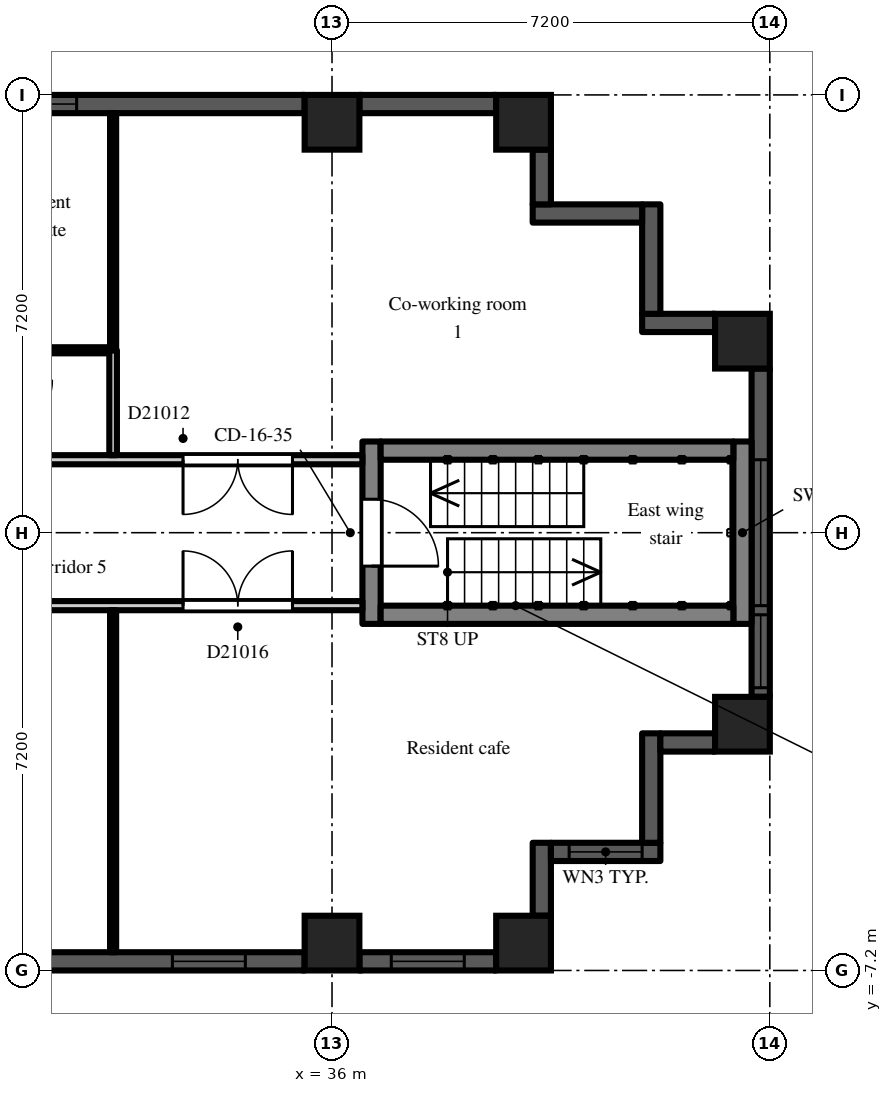
"""IFC4 building model, lengths in metres.
Left out: names, types, materials, properties, quantities, classifications, styles, units other than length and angle.
Written with IfcOpenShell. Run it as: python <this file> out.ifc"""

import sys

from ifc_helpers import new_model, si_unit, direction, frame, frame_2d, origin, origin_2d, place, context, subcontext, project, spatial, rectangle, extrude, element, fill, save


model = new_model("IFC4")
c1 = context("Model", 3, precision=1e-05, world=origin(), true_north=direction((0.0, 1.0)))
c2 = subcontext(c1, "Body", "Model", "MODEL_VIEW")
j1 = project(units=[si_unit("LENGTHUNIT", "METRE"), si_unit("PLANEANGLEUNIT", "RADIAN")], contexts=[c1])
p1 = place(None, origin())
s1 = spatial("IfcSite", under=j1, at=p1, CompositionType="ELEMENT")
p2 = place(p1, origin())
s2 = spatial("IfcBuilding", under=s1, at=p2, CompositionType="ELEMENT")
p3 = place(p2, frame((0.0, 0.0, 147.3)))
s3 = spatial("IfcBuildingStorey", under=s2, at=p3, CompositionType="ELEMENT", Elevation=147.3)
for number, where, z_axis, x_axis in (
    (1, (36.0, -6.75, 0.0), (0.0, 0.0, 1.0), (1.0, 0.0, 0.0)),
    (2, (36.0, 6.75, 0.0), (0.0, 0.0, 1.0), (1.0, 0.0, 0.0)),
    (3, (39.15, -6.75, 0.0), (0.0, 0.0, 1.0), (1.0, 0.0, 0.0)),
    (4, (39.15, 6.75, 0.0), (0.0, 0.0, 1.0), (1.0, 0.0, 0.0)),
    (5, (42.75, -3.15, 0.0), (0.0, 0.0, 1.0), (1.0, 0.0, 0.0)),
    (6, (42.75, 3.15, 0.0), (0.0, 0.0, 1.0), (1.0, 0.0, 0.0)),
):
    element("IfcColumn", number, at=place(p3, frame(where, z_axis=z_axis, x_axis=x_axis)), inside=s3, PredefinedType="COLUMN", context=c2, shape_type="SweptSolid", body=[
        extrude(rectangle(XDim=0.9, YDim=0.9, at=origin_2d()), origin(), (0.0, 0.0, 1.0), 3.0),
    ])
p4 = place(p3, frame((29.25, -7.05, 0.0), z_axis=(0.0, 0.0, 1.0), x_axis=(1.0, 0.0, 0.0)))
e7 = element("IfcWall", 7, at=p4, inside=s3, PredefinedType="SOLIDWALL", context=c2, shape_type="SweptSolid", body=[
    extrude(rectangle(XDim=6.3, YDim=0.3, at=frame_2d((3.15, 0.0))), origin(), (0.0, 0.0, 1.0), 2.2),
])
p5 = place(p4, frame((4.125, 0.0, 0.2)))
e8 = element("IfcOpeningElement", 8, at=p5, cuts=e7, PredefinedType="OPENING", context=c2, shape_type="SweptSolid", body=[
    extrude(rectangle(XDim=1.2, YDim=1.85, at=frame_2d((0.6, 0.925))), frame((0.0, 0.16, 0.0), z_axis=(0.0, -1.0, 0.0), x_axis=(1.0, 0.0, 0.0)), (0.0, 0.0, 1.0), 0.32),
])
p6 = place(p3, frame((36.45, -7.05, 0.0), z_axis=(0.0, 0.0, 1.0), x_axis=(1.0, 0.0, 0.0)))
e9 = element("IfcWall", 9, at=p6, inside=s3, PredefinedType="SOLIDWALL", context=c2, shape_type="SweptSolid", body=[
    extrude(rectangle(XDim=2.25, YDim=0.3, at=frame_2d((1.125, 0.0))), origin(), (0.0, 0.0, 1.0), 2.2),
])
p7 = place(p6, frame((0.525, 0.0, 0.2)))
e10 = element("IfcOpeningElement", 10, at=p7, cuts=e9, PredefinedType="OPENING", context=c2, shape_type="SweptSolid", body=[
    extrude(rectangle(XDim=1.2, YDim=1.85, at=frame_2d((0.6, 0.925))), frame((0.0, 0.16, 0.0), z_axis=(0.0, -1.0, 0.0), x_axis=(1.0, 0.0, 0.0)), (0.0, 0.0, 1.0), 0.32),
])
p8 = place(p3, frame((39.45, -6.3, 0.0), z_axis=(0.0, 0.0, 1.0), x_axis=(0.0, 1.0, 0.0)))
e11 = element("IfcWall", 11, at=p8, inside=s3, PredefinedType="SOLIDWALL", context=c2, shape_type="SweptSolid", body=[
    extrude(rectangle(XDim=1.2, YDim=0.3, at=frame_2d((0.6, 0.0))), origin(), (0.0, 0.0, 1.0), 2.6),
])
p9 = place(p3, frame((39.6, -5.25, 0.0), z_axis=(0.0, 0.0, 1.0), x_axis=(1.0, 0.0, 0.0)))
e12 = element("IfcWall", 12, at=p9, inside=s3, PredefinedType="SOLIDWALL", context=c2, shape_type="SweptSolid", body=[
    extrude(rectangle(XDim=1.8, YDim=0.3, at=frame_2d((0.9, 0.0))), origin(), (0.0, 0.0, 1.0), 2.6),
])
p10 = place(p9, frame((0.3, 0.0, 0.2)))
e13 = element("IfcOpeningElement", 13, at=p10, cuts=e12, PredefinedType="OPENING", context=c2, shape_type="SweptSolid", body=[
    extrude(rectangle(XDim=1.2, YDim=1.85, at=frame_2d((0.6, 0.925))), frame((0.0, 0.16, 0.0), z_axis=(0.0, -1.0, 0.0), x_axis=(1.0, 0.0, 0.0)), (0.0, 0.0, 1.0), 0.32),
])
p11 = place(p3, frame((41.25, -5.1, 0.0), z_axis=(0.0, 0.0, 1.0), x_axis=(0.0, 1.0, 0.0)))
e14 = element("IfcWall", 14, at=p11, inside=s3, PredefinedType="SOLIDWALL", context=c2, shape_type="SweptSolid", body=[
    extrude(rectangle(XDim=1.8, YDim=0.3, at=frame_2d((0.9, 0.0))), origin(), (0.0, 0.0, 1.0), 2.6),
])
p12 = place(p3, frame((41.4, -3.45, 0.0), z_axis=(0.0, 0.0, 1.0), x_axis=(1.0, 0.0, 0.0)))
e15 = element("IfcWall", 15, at=p12, inside=s3, PredefinedType="SOLIDWALL", context=c2, shape_type="SweptSolid", body=[
    extrude(rectangle(XDim=0.9, YDim=0.3, at=frame_2d((0.45, 0.0))), origin(), (0.0, 0.0, 1.0), 2.6),
])
p13 = place(p3, frame((43.05, -2.7, 0.0), z_axis=(0.0, 0.0, 1.0), x_axis=(0.0, 1.0, 0.0)))
e16 = element("IfcWall", 16, at=p13, inside=s3, PredefinedType="SOLIDWALL", context=c2, shape_type="SweptSolid", body=[
    extrude(rectangle(XDim=5.4, YDim=0.3, at=frame_2d((2.7, 0.0))), origin(), (0.0, 0.0, 1.0), 2.2),
])
p14 = place(p13, frame((1.5, 0.0, 0.2)))
e17 = element("IfcOpeningElement", 17, at=p14, cuts=e16, PredefinedType="OPENING", context=c2, shape_type="SweptSolid", body=[
    extrude(rectangle(XDim=2.4, YDim=1.85, at=frame_2d((1.2, 0.925))), frame((0.0, 0.16, 0.0), z_axis=(0.0, -1.0, 0.0), x_axis=(1.0, 0.0, 0.0)), (0.0, 0.0, 1.0), 0.32),
])
p15 = place(p13, frame((0.15, 0.0, 0.2)))
e18 = element("IfcOpeningElement", 18, at=p15, cuts=e16, PredefinedType="OPENING", context=c2, shape_type="SweptSolid", body=[
    extrude(rectangle(XDim=1.2, YDim=1.85, at=frame_2d((0.6, 0.925))), frame((0.0, 0.16, 0.0), z_axis=(0.0, -1.0, 0.0), x_axis=(1.0, 0.0, 0.0)), (0.0, 0.0, 1.0), 0.32),
])
p16 = place(p3, frame((42.3, 3.45, 0.0), z_axis=(0.0, 0.0, 1.0), x_axis=(-1.0, 0.0, 0.0)))
e19 = element("IfcWall", 19, at=p16, inside=s3, PredefinedType="SOLIDWALL", context=c2, shape_type="SweptSolid", body=[
    extrude(rectangle(XDim=1.2, YDim=0.3, at=frame_2d((0.6, 0.0))), origin(), (0.0, 0.0, 1.0), 2.6),
])
p17 = place(p3, frame((41.25, 3.6, 0.0), z_axis=(0.0, 0.0, 1.0), x_axis=(0.0, 1.0, 0.0)))
e20 = element("IfcWall", 20, at=p17, inside=s3, PredefinedType="SOLIDWALL", context=c2, shape_type="SweptSolid", body=[
    extrude(rectangle(XDim=1.8, YDim=0.3, at=frame_2d((0.9, 0.0))), origin(), (0.0, 0.0, 1.0), 2.6),
])
p18 = place(p3, frame((41.1, 5.25, 0.0), z_axis=(0.0, 0.0, 1.0), x_axis=(-1.0, 0.0, 0.0)))
e21 = element("IfcWall", 21, at=p18, inside=s3, PredefinedType="SOLIDWALL", context=c2, shape_type="SweptSolid", body=[
    extrude(rectangle(XDim=1.8, YDim=0.3, at=frame_2d((0.9, 0.0))), origin(), (0.0, 0.0, 1.0), 2.6),
])
p19 = place(p3, frame((39.45, 5.4, 0.0), z_axis=(0.0, 0.0, 1.0), x_axis=(0.0, 1.0, 0.0)))
e22 = element("IfcWall", 22, at=p19, inside=s3, PredefinedType="SOLIDWALL", context=c2, shape_type="SweptSolid", body=[
    extrude(rectangle(XDim=0.9, YDim=0.3, at=frame_2d((0.45, 0.0))), origin(), (0.0, 0.0, 1.0), 2.6),
])
p20 = place(p3, frame((38.7, 7.05, 0.0), z_axis=(0.0, 0.0, 1.0), x_axis=(-1.0, 0.0, 0.0)))
e23 = element("IfcWall", 23, at=p20, inside=s3, PredefinedType="SOLIDWALL", context=c2, shape_type="SweptSolid", body=[
    extrude(rectangle(XDim=2.25, YDim=0.3, at=frame_2d((1.125, 0.0))), origin(), (0.0, 0.0, 1.0), 2.2),
])
p21 = place(p3, frame((35.55, 7.05, 0.0), z_axis=(0.0, 0.0, 1.0), x_axis=(-1.0, 0.0, 0.0)))
e24 = element("IfcWall", 24, at=p21, inside=s3, PredefinedType="SOLIDWALL", context=c2, shape_type="SweptSolid", body=[
    extrude(rectangle(XDim=6.3, YDim=0.3, at=frame_2d((3.15, 0.0))), origin(), (0.0, 0.0, 1.0), 2.2),
])
p22 = place(p21, frame((3.75, 0.0, 0.2)))
e25 = element("IfcOpeningElement", 25, at=p22, cuts=e24, PredefinedType="OPENING", context=c2, shape_type="SweptSolid", body=[
    extrude(rectangle(XDim=2.4, YDim=1.85, at=frame_2d((1.2, 0.925))), frame((0.0, 0.16, 0.0), z_axis=(0.0, -1.0, 0.0), x_axis=(1.0, 0.0, 0.0)), (0.0, 0.0, 1.0), 0.32),
])
p23 = place(p3, frame((36.65, -1.5, 0.0), z_axis=(0.0, 0.0, 1.0), x_axis=(0.0, 1.0, 0.0)))
e26 = element("IfcWall", 26, at=p23, inside=s3, PredefinedType="SHEAR", context=c2, shape_type="SweptSolid", body=[
    extrude(rectangle(XDim=3.0, YDim=0.3, at=frame_2d((1.5, 0.0))), origin(), (0.0, 0.0, 1.0), 2.6),
])
p24 = place(p23, frame((0.95, 0.0, 0.0)))
e27 = element("IfcOpeningElement", 27, at=p24, cuts=e26, PredefinedType="OPENING", context=c2, shape_type="SweptSolid", body=[
    extrude(rectangle(XDim=1.1, YDim=2.1, at=frame_2d((0.55, 1.05))), frame((0.0, 0.16, 0.0), z_axis=(0.0, -1.0, 0.0), x_axis=(1.0, 0.0, 0.0)), (0.0, 0.0, 1.0), 0.32),
])
p25 = place(p3, frame((42.75, -1.5, 0.0), z_axis=(0.0, 0.0, 1.0), x_axis=(0.0, 1.0, 0.0)))
e28 = element("IfcWall", 28, at=p25, inside=s3, PredefinedType="SHEAR", context=c2, shape_type="SweptSolid", body=[
    extrude(rectangle(XDim=3.0, YDim=0.3, at=frame_2d((1.5, 0.0))), origin(), (0.0, 0.0, 1.0), 2.6),
])
for number, where, z_axis, x_axis in (
    (29, (36.8, -1.35, 0.0), (0.0, 0.0, 1.0), (1.0, 0.0, 0.0)),
    (30, (36.8, 1.35, 0.0), (0.0, 0.0, 1.0), (1.0, 0.0, 0.0)),
):
    element("IfcWall", number, at=place(p3, frame(where, z_axis=z_axis, x_axis=x_axis)), inside=s3, PredefinedType="SHEAR", context=c2, shape_type="SweptSolid", body=[
        extrude(rectangle(XDim=5.8, YDim=0.3, at=frame_2d((2.9, 0.0))), origin(), (0.0, 0.0, 1.0), 2.6),
    ])
p26 = place(p3, frame((21.6, -1.2, 0.0), z_axis=(0.0, 0.0, 1.0), x_axis=(1.0, 0.0, 0.0)))
e31 = element("IfcWall", 31, at=p26, inside=s3, PredefinedType="PARTITIONING", context=c2, shape_type="SweptSolid", body=[
    extrude(rectangle(XDim=14.9, YDim=0.15, at=frame_2d((7.45, 0.0))), origin(), (0.0, 0.0, 1.0), 2.6),
])
p27 = place(p26, frame((0.2, 0.0, 0.0)))
e32 = element("IfcOpeningElement", 32, at=p27, cuts=e31, PredefinedType="OPENING", context=c2, shape_type="SweptSolid", body=[
    extrude(rectangle(XDim=1.0, YDim=2.1, at=frame_2d((0.5, 1.05))), frame((0.0, 0.085, 0.0), z_axis=(0.0, -1.0, 0.0), x_axis=(1.0, 0.0, 0.0)), (0.0, 0.0, 1.0), 0.17),
])
p28 = place(p26, frame((6.3, 0.0, 0.0)))
e33 = element("IfcOpeningElement", 33, at=p28, cuts=e31, PredefinedType="OPENING", context=c2, shape_type="SweptSolid", body=[
    extrude(rectangle(XDim=1.8, YDim=2.1, at=frame_2d((0.9, 1.05))), frame((0.0, 0.085, 0.0), z_axis=(0.0, -1.0, 0.0), x_axis=(1.0, 0.0, 0.0)), (0.0, 0.0, 1.0), 0.17),
])
p29 = place(p26, frame((11.95, 0.0, 0.0)))
e34 = element("IfcOpeningElement", 34, at=p29, cuts=e31, PredefinedType="OPENING", context=c2, shape_type="SweptSolid", body=[
    extrude(rectangle(XDim=1.8, YDim=2.1, at=frame_2d((0.9, 1.05))), frame((0.0, 0.085, 0.0), z_axis=(0.0, -1.0, 0.0), x_axis=(1.0, 0.0, 0.0)), (0.0, 0.0, 1.0), 0.17),
])
p30 = place(p3, frame((21.6, 1.2, 0.0), z_axis=(0.0, 0.0, 1.0), x_axis=(1.0, 0.0, 0.0)))
e35 = element("IfcWall", 35, at=p30, inside=s3, PredefinedType="PARTITIONING", context=c2, shape_type="SweptSolid", body=[
    extrude(rectangle(XDim=14.9, YDim=0.15, at=frame_2d((7.45, 0.0))), origin(), (0.0, 0.0, 1.0), 2.6),
])
p31 = place(p30, frame((0.45, 0.0, 0.0)))
e36 = element("IfcOpeningElement", 36, at=p31, cuts=e35, PredefinedType="OPENING", context=c2, shape_type="SweptSolid", body=[
    extrude(rectangle(XDim=0.9, YDim=2.1, at=frame_2d((0.45, 1.05))), frame((0.0, 0.085, 0.0), z_axis=(0.0, -1.0, 0.0), x_axis=(1.0, 0.0, 0.0)), (0.0, 0.0, 1.0), 0.17),
])
p32 = place(p30, frame((2.25, 0.0, 0.0)))
e37 = element("IfcOpeningElement", 37, at=p32, cuts=e35, PredefinedType="OPENING", context=c2, shape_type="SweptSolid", body=[
    extrude(rectangle(XDim=0.9, YDim=2.1, at=frame_2d((0.45, 1.05))), frame((0.0, 0.085, 0.0), z_axis=(0.0, -1.0, 0.0), x_axis=(1.0, 0.0, 0.0)), (0.0, 0.0, 1.0), 0.17),
])
p33 = place(p30, frame((4.05, 0.0, 0.0)))
e38 = element("IfcOpeningElement", 38, at=p33, cuts=e35, PredefinedType="OPENING", context=c2, shape_type="SweptSolid", body=[
    extrude(rectangle(XDim=0.9, YDim=2.1, at=frame_2d((0.45, 1.05))), frame((0.0, 0.085, 0.0), z_axis=(0.0, -1.0, 0.0), x_axis=(1.0, 0.0, 0.0)), (0.0, 0.0, 1.0), 0.17),
])
p34 = place(p30, frame((5.85, 0.0, 0.0)))
e39 = element("IfcOpeningElement", 39, at=p34, cuts=e35, PredefinedType="OPENING", context=c2, shape_type="SweptSolid", body=[
    extrude(rectangle(XDim=0.9, YDim=2.1, at=frame_2d((0.45, 1.05))), frame((0.0, 0.085, 0.0), z_axis=(0.0, -1.0, 0.0), x_axis=(1.0, 0.0, 0.0)), (0.0, 0.0, 1.0), 0.17),
])
p35 = place(p30, frame((7.8, 0.0, 0.0)))
e40 = element("IfcOpeningElement", 40, at=p35, cuts=e35, PredefinedType="OPENING", context=c2, shape_type="SweptSolid", body=[
    extrude(rectangle(XDim=1.0, YDim=2.1, at=frame_2d((0.5, 1.05))), frame((0.0, 0.085, 0.0), z_axis=(0.0, -1.0, 0.0), x_axis=(1.0, 0.0, 0.0)), (0.0, 0.0, 1.0), 0.17),
])
p36 = place(p30, frame((11.95, 0.0, 0.0)))
e41 = element("IfcOpeningElement", 41, at=p36, cuts=e35, PredefinedType="OPENING", context=c2, shape_type="SweptSolid", body=[
    extrude(rectangle(XDim=1.8, YDim=2.1, at=frame_2d((0.9, 1.05))), frame((0.0, 0.085, 0.0), z_axis=(0.0, -1.0, 0.0), x_axis=(1.0, 0.0, 0.0)), (0.0, 0.0, 1.0), 0.17),
])
p37 = place(p3, frame((30.65, 3.0, 0.0), z_axis=(0.0, 0.0, 1.0), x_axis=(1.0, 0.0, 0.0)))
e42 = element("IfcWall", 42, at=p37, inside=s3, PredefinedType="PARTITIONING", context=c2, shape_type="SweptSolid", body=[
    extrude(rectangle(XDim=1.688, YDim=0.1, at=frame_2d((0.844, 0.0))), origin(), (0.0, 0.0, 1.0), 2.6),
])
p38 = place(p3, frame((32.4, -6.9, 0.0), z_axis=(0.0, 0.0, 1.0), x_axis=(0.0, 1.0, 0.0)))
e43 = element("IfcWall", 43, at=p38, inside=s3, PredefinedType="PARTITIONING", context=c2, shape_type="SweptSolid", body=[
    extrude(rectangle(XDim=5.625, YDim=0.1, at=frame_2d((2.812, 0.0))), origin(), (0.0, 0.0, 1.0), 2.6),
])
p39 = place(p3, frame((32.4, 1.275, 0.0), z_axis=(0.0, 0.0, 1.0), x_axis=(0.0, 1.0, 0.0)))
e44 = element("IfcWall", 44, at=p39, inside=s3, PredefinedType="PARTITIONING", context=c2, shape_type="SweptSolid", body=[
    extrude(rectangle(XDim=1.725, YDim=0.125, at=frame_2d((0.863, 0.0))), origin(), (0.0, 0.0, 1.0), 2.6),
])
p40 = place(p3, frame((32.4, 3.0, 0.0), z_axis=(0.0, 0.0, 1.0), x_axis=(0.0, 1.0, 0.0)))
e45 = element("IfcWall", 45, at=p40, inside=s3, PredefinedType="PARTITIONING", context=c2, shape_type="SweptSolid", body=[
    extrude(rectangle(XDim=3.9, YDim=0.1, at=frame_2d((1.95, 0.0))), origin(), (0.0, 0.0, 1.0), 2.6),
])
p41 = place(p5, origin())
e46 = element("IfcWindow", 46, at=p41, inside=s3, PartitioningType="SINGLE_PANEL", PredefinedType="WINDOW", context=c2, shape_type="SweptSolid", body=[
    extrude(rectangle(XDim=1.2, YDim=1.85, at=frame_2d((0.6, 0.925))), frame((0.0, 0.03, 0.0), z_axis=(0.0, -1.0, 0.0), x_axis=(1.0, 0.0, 0.0)), (0.0, 0.0, 1.0), 0.06),
])
fill(e8, e46)
p42 = place(p7, origin())
e47 = element("IfcWindow", 47, at=p42, inside=s3, PartitioningType="SINGLE_PANEL", PredefinedType="WINDOW", context=c2, shape_type="SweptSolid", body=[
    extrude(rectangle(XDim=1.2, YDim=1.85, at=frame_2d((0.6, 0.925))), frame((0.0, 0.03, 0.0), z_axis=(0.0, -1.0, 0.0), x_axis=(1.0, 0.0, 0.0)), (0.0, 0.0, 1.0), 0.06),
])
fill(e10, e47)
p43 = place(p10, origin())
e48 = element("IfcWindow", 48, at=p43, inside=s3, PartitioningType="SINGLE_PANEL", PredefinedType="WINDOW", context=c2, shape_type="SweptSolid", body=[
    extrude(rectangle(XDim=1.2, YDim=1.85, at=frame_2d((0.6, 0.925))), frame((0.0, 0.03, 0.0), z_axis=(0.0, -1.0, 0.0), x_axis=(1.0, 0.0, 0.0)), (0.0, 0.0, 1.0), 0.06),
])
fill(e13, e48)
p44 = place(p14, origin())
e49 = element("IfcWindow", 49, at=p44, inside=s3, PartitioningType="SINGLE_PANEL", PredefinedType="WINDOW", context=c2, shape_type="SweptSolid", body=[
    extrude(rectangle(XDim=2.4, YDim=1.85, at=frame_2d((1.2, 0.925))), frame((0.0, 0.03, 0.0), z_axis=(0.0, -1.0, 0.0), x_axis=(1.0, 0.0, 0.0)), (0.0, 0.0, 1.0), 0.06),
])
fill(e17, e49)
p45 = place(p15, origin())
e50 = element("IfcWindow", 50, at=p45, inside=s3, PartitioningType="SINGLE_PANEL", PredefinedType="WINDOW", context=c2, shape_type="SweptSolid", body=[
    extrude(rectangle(XDim=1.2, YDim=1.85, at=frame_2d((0.6, 0.925))), frame((0.0, 0.03, 0.0), z_axis=(0.0, -1.0, 0.0), x_axis=(1.0, 0.0, 0.0)), (0.0, 0.0, 1.0), 0.06),
])
fill(e18, e50)
p46 = place(p22, origin())
e51 = element("IfcWindow", 51, at=p46, inside=s3, PartitioningType="SINGLE_PANEL", PredefinedType="WINDOW", context=c2, shape_type="SweptSolid", body=[
    extrude(rectangle(XDim=2.4, YDim=1.85, at=frame_2d((1.2, 0.925))), frame((0.0, 0.03, 0.0), z_axis=(0.0, -1.0, 0.0), x_axis=(1.0, 0.0, 0.0)), (0.0, 0.0, 1.0), 0.06),
])
fill(e25, e51)
p47 = place(p24, frame((1.1, 0.0, 0.0), z_axis=(0.0, 0.0, 1.0), x_axis=(-1.0, 0.0, 0.0)))
e52 = element("IfcDoor", 52, at=p47, inside=s3, OperationType="SINGLE_SWING_RIGHT", PredefinedType="DOOR", context=c2, shape_type="SweptSolid", body=[
    extrude(rectangle(XDim=1.1, YDim=2.1, at=frame_2d((0.55, 1.05))), frame((0.0, 0.025, 0.0), z_axis=(0.0, -1.0, 0.0), x_axis=(1.0, 0.0, 0.0)), (0.0, 0.0, 1.0), 0.05),
])
fill(e27, e52)
p48 = place(p36, frame((1.8, 0.0, 0.0), z_axis=(0.0, 0.0, 1.0), x_axis=(-1.0, 0.0, 0.0)))
e53 = element("IfcDoor", 53, at=p48, inside=s3, OperationType="DOUBLE_DOOR_DOUBLE_SWING", PredefinedType="DOOR", context=c2, shape_type="SweptSolid", body=[
    extrude(rectangle(XDim=1.8, YDim=2.1, at=frame_2d((0.9, 1.05))), frame((0.0, 0.025, 0.0), z_axis=(0.0, -1.0, 0.0), x_axis=(1.0, 0.0, 0.0)), (0.0, 0.0, 1.0), 0.05),
])
fill(e41, e53)
p49 = place(p29, origin())
e54 = element("IfcDoor", 54, at=p49, inside=s3, OperationType="DOUBLE_DOOR_DOUBLE_SWING", PredefinedType="DOOR", context=c2, shape_type="SweptSolid", body=[
    extrude(rectangle(XDim=1.8, YDim=2.1, at=frame_2d((0.9, 1.05))), frame((0.0, 0.025, 0.0), z_axis=(0.0, -1.0, 0.0), x_axis=(1.0, 0.0, 0.0)), (0.0, 0.0, 1.0), 0.05),
])
fill(e34, e54)
save(model, sys.argv[1])
